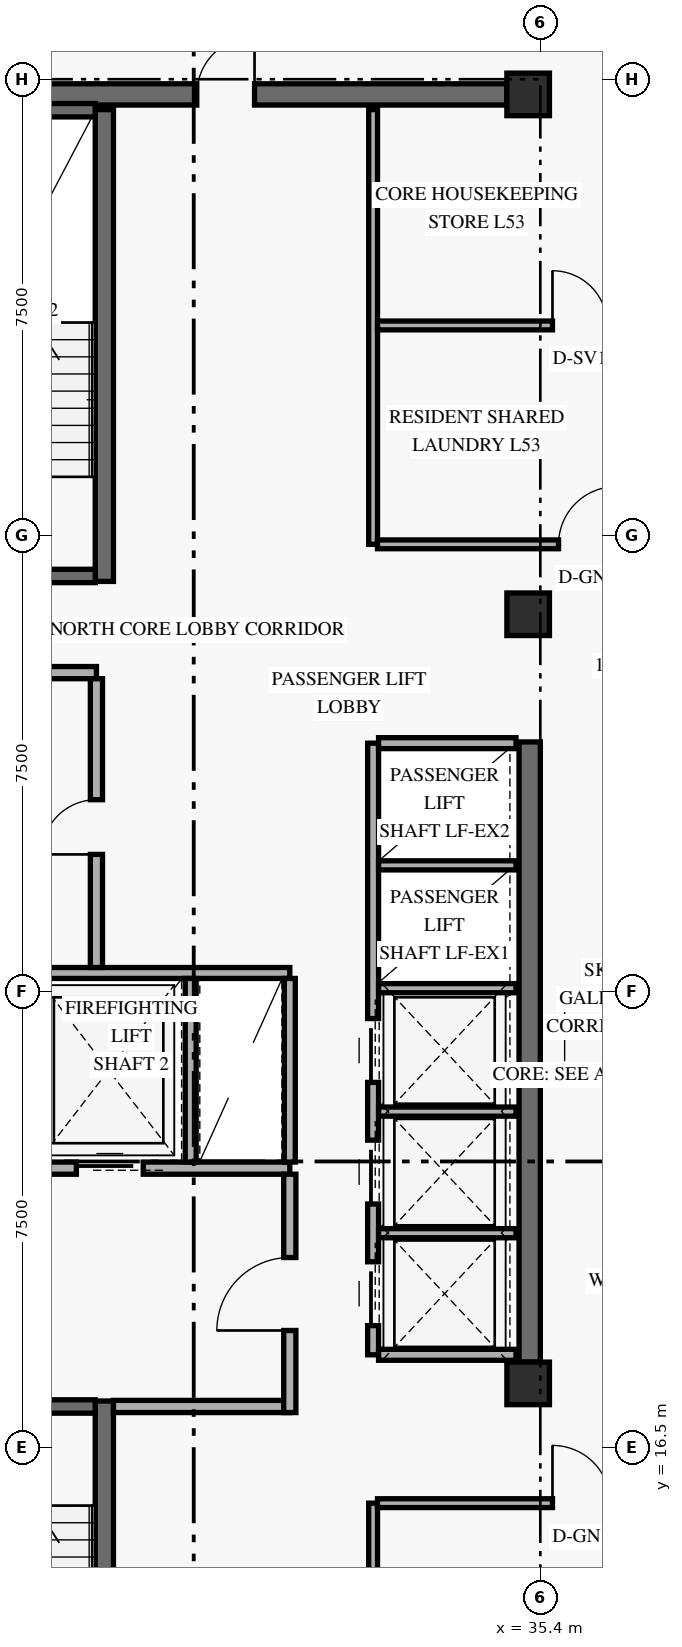
"""IFC4 building model, lengths in metres.
Left out: names, types, materials, properties, quantities, classifications, styles, units other than length and angle.
Written with IfcOpenShell. Run it as: python <this file> out.ifc"""

import sys

from ifc_helpers import new_model, si_unit, direction, frame, frame_2d, origin, origin_2d, place, context, subcontext, project, spatial, rectangle, extrude, element, fill, save


model = new_model("IFC4")
c1 = context("Model", 3, precision=1e-05, world=origin(), true_north=direction((0.0, 1.0)))
c2 = subcontext(c1, "Body", "Model", "MODEL_VIEW")
j1 = project(units=[si_unit("LENGTHUNIT", "METRE"), si_unit("PLANEANGLEUNIT", "RADIAN")], contexts=[c1])
p1 = place(None, origin())
s1 = spatial("IfcSite", under=j1, at=p1, CompositionType="ELEMENT")
p2 = place(p1, origin())
s2 = spatial("IfcBuilding", under=s1, at=p2, CompositionType="ELEMENT")
p3 = place(p2, frame((0.0, 0.0, 205.8)))
s3 = spatial("IfcBuildingStorey", under=s2, at=p3, CompositionType="ELEMENT", Elevation=205.8)
p4 = place(p3, frame((35.225, 17.9, 0.0), z_axis=(0.0, 0.0, 1.0), x_axis=(0.0, 1.0, 0.0)))
e1 = element("IfcWall", 1, at=p4, inside=s3, PredefinedType="SHEAR", context=c2, shape_type="SweptSolid", body=[
    extrude(rectangle(XDim=10.2, YDim=0.35, at=frame_2d((5.1, 0.0))), origin(), (0.0, 0.0, 1.0), 2.821),
])
p5 = place(p3, frame((24.55, 38.75, 0.0), z_axis=(0.0, 0.0, 1.0), x_axis=(1.0, 0.0, 0.0)))
e2 = element("IfcWall", 2, at=p5, inside=s3, PredefinedType="SHEAR", context=c2, shape_type="SweptSolid", body=[
    extrude(rectangle(XDim=10.3, YDim=0.35, at=frame_2d((5.15, 0.0))), origin(), (0.0, 0.0, 1.0), 3.36),
])
p6 = place(p5, frame((5.2, 0.0, 0.0)))
e3 = element("IfcOpeningElement", 3, at=p6, cuts=e2, PredefinedType="OPENING", context=c2, shape_type="SweptSolid", body=[
    extrude(rectangle(XDim=0.95, YDim=2.15, at=frame_2d((0.475, 1.075))), frame((0.0, 0.185, 0.0), z_axis=(0.0, -1.0, 0.0), x_axis=(1.0, 0.0, 0.0)), (0.0, 0.0, 1.0), 0.37),
])
p7 = place(p3, frame((28.23, 9.5, 0.0), z_axis=(0.0, 0.0, 1.0), x_axis=(0.0, 1.0, 0.0)))
e4 = element("IfcWall", 4, at=p7, inside=s3, PredefinedType="SHEAR", context=c2, shape_type="SweptSolid", body=[
    extrude(rectangle(XDim=7.76, YDim=0.3, at=frame_2d((3.88, 0.0))), origin(), (0.0, 0.0, 1.0), 3.36),
])
p8 = place(p3, frame((24.92, 17.17, 0.0), z_axis=(0.0, 0.0, 1.0), x_axis=(1.0, 0.0, 0.0)))
e5 = element("IfcWall", 5, at=p8, inside=s3, PredefinedType="SHEAR", context=c2, shape_type="SweptSolid", body=[
    extrude(rectangle(XDim=3.16, YDim=0.22, at=frame_2d((1.58, 0.0))), origin(), (0.0, 0.0, 1.0), 3.36),
])
p9 = place(p8, frame((0.78, 0.0, 0.0)))
e6 = element("IfcOpeningElement", 6, at=p9, cuts=e5, PredefinedType="OPENING", context=c2, shape_type="SweptSolid", body=[
    extrude(rectangle(XDim=1.05, YDim=2.15, at=frame_2d((0.525, 1.075))), frame((0.0, 0.12, 0.0), z_axis=(0.0, -1.0, 0.0), x_axis=(1.0, 0.0, 0.0)), (0.0, 0.0, 1.0), 0.24),
])
p10 = place(p3, frame((28.23, 30.74, 0.0), z_axis=(0.0, 0.0, 1.0), x_axis=(0.0, 1.0, 0.0)))
e7 = element("IfcWall", 7, at=p10, inside=s3, PredefinedType="SHEAR", context=c2, shape_type="SweptSolid", body=[
    extrude(rectangle(XDim=7.76, YDim=0.3, at=frame_2d((3.88, 0.0))), origin(), (0.0, 0.0, 1.0), 3.36),
])
p11 = place(p3, frame((24.92, 30.83, 0.0), z_axis=(0.0, 0.0, 1.0), x_axis=(1.0, 0.0, 0.0)))
e8 = element("IfcWall", 8, at=p11, inside=s3, PredefinedType="SHEAR", context=c2, shape_type="SweptSolid", body=[
    extrude(rectangle(XDim=3.16, YDim=0.22, at=frame_2d((1.58, 0.0))), origin(), (0.0, 0.0, 1.0), 3.36),
])
p12 = place(p11, frame((0.78, 0.0, 0.0)))
e9 = element("IfcOpeningElement", 9, at=p12, cuts=e8, PredefinedType="OPENING", context=c2, shape_type="SweptSolid", body=[
    extrude(rectangle(XDim=1.05, YDim=2.15, at=frame_2d((0.525, 1.075))), frame((0.0, 0.12, 0.0), z_axis=(0.0, -1.0, 0.0), x_axis=(1.0, 0.0, 0.0)), (0.0, 0.0, 1.0), 0.24),
])
p13 = place(p3, frame((24.92, 38.49, 0.0), z_axis=(0.0, 0.0, 1.0), x_axis=(1.0, 0.0, 0.0)))
e10 = element("IfcWall", 10, at=p13, inside=s3, PredefinedType="SHEAR", context=c2, shape_type="SweptSolid", body=[
    extrude(rectangle(XDim=3.16, YDim=0.22, at=frame_2d((1.58, 0.0))), origin(), (0.0, 0.0, 1.0), 3.36),
])
for number, where, z_axis, x_axis in (
    (11, (35.2, 17.55, 0.0), (0.0, 0.0, 1.0), (1.0, 0.0, 0.0)),
    (12, (35.2, 30.2, 0.0), (0.0, 0.0, 1.0), (1.0, 0.0, 0.0)),
    (13, (35.2, 38.75, 0.0), (0.0, 0.0, 1.0), (1.0, 0.0, 0.0)),
):
    element("IfcColumn", number, at=place(p3, frame(where, z_axis=z_axis, x_axis=x_axis)), inside=s3, PredefinedType="COLUMN", context=c2, shape_type="SweptSolid", body=[
        extrude(rectangle(XDim=0.7, YDim=0.7, at=origin_2d()), origin(), (0.0, 0.0, 1.0), 3.6),
    ])
p14 = place(p3, frame((24.45, 21.09, 0.0), z_axis=(0.0, 0.0, 1.0), x_axis=(1.0, 0.0, 0.0)))
e14 = element("IfcWall", 14, at=p14, inside=s3, PredefinedType="STANDARD", context=c2, shape_type="SweptSolid", body=[
    extrude(rectangle(XDim=6.83, YDim=0.2, at=frame_2d((3.415, 0.0))), origin(), (0.0, 0.0, 1.0), 3.36),
])
p15 = place(p14, frame((0.72, 0.0, 0.0)))
e15 = element("IfcOpeningElement", 15, at=p15, cuts=e14, PredefinedType="OPENING", context=c2, shape_type="SweptSolid", body=[
    extrude(rectangle(XDim=1.1, YDim=2.2, at=frame_2d((0.55, 1.1))), frame((0.0, 0.11, 0.0), z_axis=(0.0, -1.0, 0.0), x_axis=(1.0, 0.0, 0.0)), (0.0, 0.0, 1.0), 0.22),
])
p16 = place(p14, frame((3.32, 0.0, 0.0)))
e16 = element("IfcOpeningElement", 16, at=p16, cuts=e14, PredefinedType="OPENING", context=c2, shape_type="SweptSolid", body=[
    extrude(rectangle(XDim=1.1, YDim=2.2, at=frame_2d((0.55, 1.1))), frame((0.0, 0.11, 0.0), z_axis=(0.0, -1.0, 0.0), x_axis=(1.0, 0.0, 0.0)), (0.0, 0.0, 1.0), 0.22),
])
p17 = place(p3, frame((28.38, 17.17, 0.0), z_axis=(0.0, 0.0, 1.0), x_axis=(1.0, 0.0, 0.0)))
e17 = element("IfcWall", 17, at=p17, inside=s3, PredefinedType="STANDARD", context=c2, shape_type="SweptSolid", body=[
    extrude(rectangle(XDim=2.9, YDim=0.2, at=frame_2d((1.45, 0.0))), origin(), (0.0, 0.0, 1.0), 3.36),
])
p18 = place(p3, frame((31.28, 17.07, 0.0), z_axis=(0.0, 0.0, 1.0), x_axis=(0.0, 1.0, 0.0)))
e18 = element("IfcWall", 18, at=p18, inside=s3, PredefinedType="STANDARD", context=c2, shape_type="SweptSolid", body=[
    extrude(rectangle(XDim=3.92, YDim=0.2, at=frame_2d((1.96, 0.0))), origin(), (0.0, 0.0, 1.0), 2.803),
])
p19 = place(p18, frame((1.35, 0.0, 0.0)))
e19 = element("IfcOpeningElement", 19, at=p19, cuts=e18, PredefinedType="OPENING", context=c2, shape_type="SweptSolid", body=[
    extrude(rectangle(XDim=1.2, YDim=2.15, at=frame_2d((0.6, 1.075))), frame((0.0, 0.11, 0.0), z_axis=(0.0, -1.0, 0.0), x_axis=(1.0, 0.0, 0.0)), (0.0, 0.0, 1.0), 0.22),
])
p20 = place(p3, frame((24.45, 24.3, 0.0), z_axis=(0.0, 0.0, 1.0), x_axis=(1.0, 0.0, 0.0)))
e20 = element("IfcWall", 20, at=p20, inside=s3, PredefinedType="STANDARD", context=c2, shape_type="SweptSolid", body=[
    extrude(rectangle(XDim=6.83, YDim=0.18, at=frame_2d((3.415, 0.0))), origin(), (0.0, 0.0, 1.0), 3.36),
])
for number, where, z_axis, x_axis in (
    (21, (29.65, 21.19, 0.0), (0.0, 0.0, 1.0), (0.0, 1.0, 0.0)),
    (22, (31.28, 21.19, 0.0), (0.0, 0.0, 1.0), (0.0, 1.0, 0.0)),
):
    element("IfcWall", number, at=place(p3, frame(where, z_axis=z_axis, x_axis=x_axis)), inside=s3, PredefinedType="STANDARD", context=c2, shape_type="SweptSolid", body=[
        extrude(rectangle(XDim=3.02, YDim=0.18, at=frame_2d((1.51, 0.0))), origin(), (0.0, 0.0, 1.0), 3.36),
    ])
p21 = place(p3, frame((24.45, 29.24, 0.0), z_axis=(0.0, 0.0, 1.0), x_axis=(1.0, 0.0, 0.0)))
e23 = element("IfcWall", 23, at=p21, inside=s3, PredefinedType="STANDARD", context=c2, shape_type="SweptSolid", body=[
    extrude(rectangle(XDim=3.65, YDim=0.2, at=frame_2d((1.825, 0.0))), origin(), (0.0, 0.0, 1.0), 3.36),
])
p22 = place(p3, frame((28.1, 24.39, 0.0), z_axis=(0.0, 0.0, 1.0), x_axis=(0.0, 1.0, 0.0)))
e24 = element("IfcWall", 24, at=p22, inside=s3, PredefinedType="STANDARD", context=c2, shape_type="SweptSolid", body=[
    extrude(rectangle(XDim=4.75, YDim=0.2, at=frame_2d((2.375, 0.0))), origin(), (0.0, 0.0, 1.0), 3.36),
])
p23 = place(p22, frame((1.86, 0.0, 0.0)))
e25 = element("IfcOpeningElement", 25, at=p23, cuts=e24, PredefinedType="OPENING", context=c2, shape_type="SweptSolid", body=[
    extrude(rectangle(XDim=0.9, YDim=2.1, at=frame_2d((0.45, 1.05))), frame((0.0, 0.11, 0.0), z_axis=(0.0, -1.0, 0.0), x_axis=(1.0, 0.0, 0.0)), (0.0, 0.0, 1.0), 0.22),
])
p24 = place(p3, frame((32.65, 18.02, 0.0), z_axis=(0.0, 0.0, 1.0), x_axis=(0.0, 1.0, 0.0)))
e26 = element("IfcWall", 26, at=p24, inside=s3, PredefinedType="STANDARD", context=c2, shape_type="SweptSolid", body=[
    extrude(rectangle(XDim=10.06, YDim=0.18, at=frame_2d((5.03, 0.0))), origin(), (0.0, 0.0, 1.0), 3.36),
])
p25 = place(p24, frame((0.48, 0.0, 0.0)))
e27 = element("IfcOpeningElement", 27, at=p25, cuts=e26, PredefinedType="OPENING", context=c2, shape_type="SweptSolid", body=[
    extrude(rectangle(XDim=1.05, YDim=2.2, at=frame_2d((0.525, 1.1))), frame((0.0, 0.1, 0.0), z_axis=(0.0, -1.0, 0.0), x_axis=(1.0, 0.0, 0.0)), (0.0, 0.0, 1.0), 0.2),
])
p26 = place(p24, frame((2.48, 0.0, 0.0)))
e28 = element("IfcOpeningElement", 28, at=p26, cuts=e26, PredefinedType="OPENING", context=c2, shape_type="SweptSolid", body=[
    extrude(rectangle(XDim=1.05, YDim=2.2, at=frame_2d((0.525, 1.1))), frame((0.0, 0.1, 0.0), z_axis=(0.0, -1.0, 0.0), x_axis=(1.0, 0.0, 0.0)), (0.0, 0.0, 1.0), 0.2),
])
p27 = place(p24, frame((4.48, 0.0, 0.0)))
e29 = element("IfcOpeningElement", 29, at=p27, cuts=e26, PredefinedType="OPENING", context=c2, shape_type="SweptSolid", body=[
    extrude(rectangle(XDim=1.05, YDim=2.2, at=frame_2d((0.525, 1.1))), frame((0.0, 0.1, 0.0), z_axis=(0.0, -1.0, 0.0), x_axis=(1.0, 0.0, 0.0)), (0.0, 0.0, 1.0), 0.2),
])
for number, where, z_axis, x_axis in (
    (30, (32.74, 18.02, 0.0), (0.0, 0.0, 1.0), (1.0, 0.0, 0.0)),
    (31, (32.74, 28.08, 0.0), (0.0, 0.0, 1.0), (1.0, 0.0, 0.0)),
):
    element("IfcWall", number, at=place(p3, frame(where, z_axis=z_axis, x_axis=x_axis)), inside=s3, PredefinedType="STANDARD", context=c2, shape_type="SweptSolid", body=[
        extrude(rectangle(XDim=2.26, YDim=0.18, at=frame_2d((1.13, 0.0))), origin(), (0.0, 0.0, 1.0), 3.36),
    ])
for number, where, z_axis, x_axis in (
    (32, (32.74, 20.02, 0.0), (0.0, 0.0, 1.0), (1.0, 0.0, 0.0)),
    (33, (32.74, 22.02, 0.0), (0.0, 0.0, 1.0), (1.0, 0.0, 0.0)),
    (34, (32.74, 24.05, 0.0), (0.0, 0.0, 1.0), (1.0, 0.0, 0.0)),
    (35, (32.74, 26.07, 0.0), (0.0, 0.0, 1.0), (1.0, 0.0, 0.0)),
):
    element("IfcWall", number, at=place(p3, frame(where, z_axis=z_axis, x_axis=x_axis)), inside=s3, PredefinedType="STANDARD", context=c2, shape_type="SweptSolid", body=[
        extrude(rectangle(XDim=2.26, YDim=0.15, at=frame_2d((1.13, 0.0))), origin(), (0.0, 0.0, 1.0), 3.36),
    ])
p28 = place(p3, frame((32.65, 9.5, 0.0), z_axis=(0.0, 0.0, 1.0), x_axis=(0.0, 1.0, 0.0)))
e36 = element("IfcWall", 36, at=p28, inside=s3, PredefinedType="PARTITIONING", context=c2, shape_type="SweptSolid", body=[
    extrude(rectangle(XDim=6.08, YDim=0.145, at=frame_2d((3.04, 0.0))), origin(), (0.0, 0.0, 1.0), 3.36),
])
p29 = place(p3, frame((32.722, 15.58, 0.0), z_axis=(0.0, 0.0, 1.0), x_axis=(1.0, 0.0, 0.0)))
e37 = element("IfcWall", 37, at=p29, inside=s3, PredefinedType="PARTITIONING", context=c2, shape_type="SweptSolid", body=[
    extrude(rectangle(XDim=4.828, YDim=0.145, at=frame_2d((2.414, 0.0))), origin(), (0.0, 0.0, 1.0), 2.803),
])
p30 = place(p29, frame((2.877, 0.0, 0.0)))
e38 = element("IfcOpeningElement", 38, at=p30, cuts=e37, PredefinedType="OPENING", context=c2, shape_type="SweptSolid", body=[
    extrude(rectangle(XDim=0.95, YDim=2.15, at=frame_2d((0.475, 1.075))), frame((0.0, 0.083, 0.0), z_axis=(0.0, -1.0, 0.0), x_axis=(1.0, 0.0, 0.0)), (0.0, 0.0, 1.0), 0.165),
])
p31 = place(p3, frame((32.65, 31.35, 0.0), z_axis=(0.0, 0.0, 1.0), x_axis=(0.0, 1.0, 0.0)))
e39 = element("IfcWall", 39, at=p31, inside=s3, PredefinedType="PARTITIONING", context=c2, shape_type="SweptSolid", body=[
    extrude(rectangle(XDim=7.15, YDim=0.145, at=frame_2d((3.575, 0.0))), origin(), (0.0, 0.0, 1.0), 3.36),
])
p32 = place(p3, frame((32.722, 31.35, 0.0), z_axis=(0.0, 0.0, 1.0), x_axis=(1.0, 0.0, 0.0)))
e40 = element("IfcWall", 40, at=p32, inside=s3, PredefinedType="PARTITIONING", context=c2, shape_type="SweptSolid", body=[
    extrude(rectangle(XDim=5.378, YDim=0.145, at=frame_2d((2.689, 0.0))), origin(), (0.0, 0.0, 1.0), 2.803),
])
p33 = place(p32, frame((2.978, 0.0, 0.0)))
e41 = element("IfcOpeningElement", 41, at=p33, cuts=e40, PredefinedType="OPENING", context=c2, shape_type="SweptSolid", body=[
    extrude(rectangle(XDim=0.95, YDim=2.15, at=frame_2d((0.475, 1.075))), frame((0.0, 0.083, 0.0), z_axis=(0.0, -1.0, 0.0), x_axis=(1.0, 0.0, 0.0)), (0.0, 0.0, 1.0), 0.165),
])
p34 = place(p3, frame((32.722, 34.95, 0.0), z_axis=(0.0, 0.0, 1.0), x_axis=(1.0, 0.0, 0.0)))
e42 = element("IfcWall", 42, at=p34, inside=s3, PredefinedType="PARTITIONING", context=c2, shape_type="SweptSolid", body=[
    extrude(rectangle(XDim=5.305, YDim=0.145, at=frame_2d((2.653, 0.0))), origin(), (0.0, 0.0, 1.0), 2.803),
])
p35 = place(p34, frame((2.877, 0.0, 0.0)))
e43 = element("IfcOpeningElement", 43, at=p35, cuts=e42, PredefinedType="OPENING", context=c2, shape_type="SweptSolid", body=[
    extrude(rectangle(XDim=0.9, YDim=2.1, at=frame_2d((0.45, 1.05))), frame((0.0, 0.083, 0.0), z_axis=(0.0, -1.0, 0.0), x_axis=(1.0, 0.0, 0.0)), (0.0, 0.0, 1.0), 0.165),
])
p36 = place(p16, origin())
e44 = element("IfcDoor", 44, at=p36, inside=s3, OperationType="SLIDING_TO_LEFT", PredefinedType="DOOR", context=c2, shape_type="SweptSolid", body=[
    extrude(rectangle(XDim=1.1, YDim=2.2, at=frame_2d((0.55, 1.1))), frame((0.0, 0.025, 0.0), z_axis=(0.0, -1.0, 0.0), x_axis=(1.0, 0.0, 0.0)), (0.0, 0.0, 1.0), 0.05),
])
fill(e16, e44)
p37 = place(p19, origin())
e45 = element("IfcDoor", 45, at=p37, inside=s3, OperationType="SINGLE_SWING_LEFT", PredefinedType="DOOR", context=c2, shape_type="SweptSolid", body=[
    extrude(rectangle(XDim=1.2, YDim=2.15, at=frame_2d((0.6, 1.075))), frame((0.0, 0.025, 0.0), z_axis=(0.0, -1.0, 0.0), x_axis=(1.0, 0.0, 0.0)), (0.0, 0.0, 1.0), 0.05),
])
fill(e19, e45)
p38 = place(p23, origin())
e46 = element("IfcDoor", 46, at=p38, inside=s3, OperationType="SINGLE_SWING_LEFT", PredefinedType="DOOR", context=c2, shape_type="SweptSolid", body=[
    extrude(rectangle(XDim=0.9, YDim=2.1, at=frame_2d((0.45, 1.05))), frame((0.0, 0.025, 0.0), z_axis=(0.0, -1.0, 0.0), x_axis=(1.0, 0.0, 0.0)), (0.0, 0.0, 1.0), 0.05),
])
fill(e25, e46)
p39 = place(p25, origin())
e47 = element("IfcDoor", 47, at=p39, inside=s3, OperationType="SLIDING_TO_LEFT", PredefinedType="DOOR", context=c2, shape_type="SweptSolid", body=[
    extrude(rectangle(XDim=1.05, YDim=2.2, at=frame_2d((0.525, 1.1))), frame((0.0, 0.025, 0.0), z_axis=(0.0, -1.0, 0.0), x_axis=(1.0, 0.0, 0.0)), (0.0, 0.0, 1.0), 0.05),
])
fill(e27, e47)
p40 = place(p26, origin())
e48 = element("IfcDoor", 48, at=p40, inside=s3, OperationType="SLIDING_TO_LEFT", PredefinedType="DOOR", context=c2, shape_type="SweptSolid", body=[
    extrude(rectangle(XDim=1.05, YDim=2.2, at=frame_2d((0.525, 1.1))), frame((0.0, 0.025, 0.0), z_axis=(0.0, -1.0, 0.0), x_axis=(1.0, 0.0, 0.0)), (0.0, 0.0, 1.0), 0.05),
])
fill(e28, e48)
p41 = place(p27, origin())
e49 = element("IfcDoor", 49, at=p41, inside=s3, OperationType="SLIDING_TO_LEFT", PredefinedType="DOOR", context=c2, shape_type="SweptSolid", body=[
    extrude(rectangle(XDim=1.05, YDim=2.2, at=frame_2d((0.525, 1.1))), frame((0.0, 0.025, 0.0), z_axis=(0.0, -1.0, 0.0), x_axis=(1.0, 0.0, 0.0)), (0.0, 0.0, 1.0), 0.05),
])
fill(e29, e49)
p42 = place(p30, origin())
e50 = element("IfcDoor", 50, at=p42, inside=s3, OperationType="SINGLE_SWING_LEFT", PredefinedType="DOOR", context=c2, shape_type="SweptSolid", body=[
    extrude(rectangle(XDim=0.95, YDim=2.15, at=frame_2d((0.475, 1.075))), frame((0.0, 0.025, 0.0), z_axis=(0.0, -1.0, 0.0), x_axis=(1.0, 0.0, 0.0)), (0.0, 0.0, 1.0), 0.05),
])
fill(e38, e50)
p43 = place(p33, origin())
e51 = element("IfcDoor", 51, at=p43, inside=s3, OperationType="SINGLE_SWING_RIGHT", PredefinedType="DOOR", context=c2, shape_type="SweptSolid", body=[
    extrude(rectangle(XDim=0.95, YDim=2.15, at=frame_2d((0.475, 1.075))), frame((0.0, 0.025, 0.0), z_axis=(0.0, -1.0, 0.0), x_axis=(1.0, 0.0, 0.0)), (0.0, 0.0, 1.0), 0.05),
])
fill(e41, e51)
p44 = place(p35, origin())
e52 = element("IfcDoor", 52, at=p44, inside=s3, OperationType="SINGLE_SWING_LEFT", PredefinedType="DOOR", context=c2, shape_type="SweptSolid", body=[
    extrude(rectangle(XDim=0.9, YDim=2.1, at=frame_2d((0.45, 1.05))), frame((0.0, 0.025, 0.0), z_axis=(0.0, -1.0, 0.0), x_axis=(1.0, 0.0, 0.0)), (0.0, 0.0, 1.0), 0.05),
])
fill(e43, e52)
p45 = place(p6, origin())
e53 = element("IfcDoor", 53, at=p45, inside=s3, OperationType="SINGLE_SWING_RIGHT", PredefinedType="DOOR", context=c2, shape_type="SweptSolid", body=[
    extrude(rectangle(XDim=0.95, YDim=2.15, at=frame_2d((0.475, 1.075))), frame((0.0, 0.025, 0.0), z_axis=(0.0, -1.0, 0.0), x_axis=(1.0, 0.0, 0.0)), (0.0, 0.0, 1.0), 0.05),
])
fill(e3, e53)
save(model, sys.argv[1])
